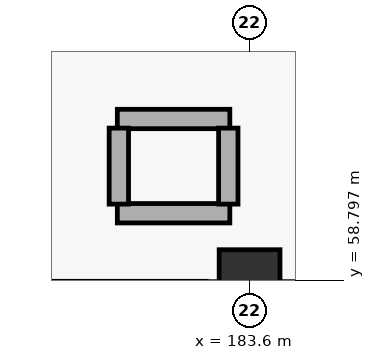
"""IFC4 building model, lengths in metres.
Left out: names, types, materials, properties, quantities, classifications, styles, units other than length and angle.
Written with IfcOpenShell. Run it as: python <this file> out.ifc"""

import sys

from ifc_helpers import new_model, si_unit, direction, frame, frame_2d, origin, origin_2d, place, context, subcontext, project, spatial, rectangle, extrude, element, save


model = new_model("IFC4")
c1 = context("Model", 3, precision=1e-05, world=origin(), true_north=direction((0.0, 1.0)))
c2 = subcontext(c1, "Body", "Model", "MODEL_VIEW")
j1 = project(units=[si_unit("LENGTHUNIT", "METRE"), si_unit("PLANEANGLEUNIT", "RADIAN")], contexts=[c1])
p1 = place(None, origin())
s1 = spatial("IfcSite", under=j1, at=p1, CompositionType="ELEMENT")
p2 = place(p1, origin())
s2 = spatial("IfcBuilding", under=s1, at=p2, CompositionType="ELEMENT")
p3 = place(p2, frame((0.0, 0.0, 10.5)))
s3 = spatial("IfcBuildingStorey", under=s2, at=p3, CompositionType="ELEMENT", Elevation=10.5)
p4 = place(p3, frame((183.6, 58.8, 0.0), z_axis=(0.0, 0.0, 1.0), x_axis=(1.0, 0.0, 0.0)))
e1 = element("IfcColumn", 1, at=p4, inside=s3, PredefinedType="COLUMN", context=c2, shape_type="SweptSolid", body=[
    extrude(rectangle(XDim=0.8, YDim=0.8, at=origin_2d()), origin(), (0.0, 0.0, 1.0), 5.1),
])
for number, where, z_axis, x_axis in (
    (2, (181.86, 60.92, 0.0), (0.0, 0.0, 1.0), (1.0, 0.0, 0.0)),
    (3, (181.86, 59.68, 0.0), (0.0, 0.0, 1.0), (1.0, 0.0, 0.0)),
):
    element("IfcWall", number, at=place(p3, frame(where, z_axis=z_axis, x_axis=x_axis)), inside=s3, PredefinedType="PARTITIONING", context=c2, shape_type="SweptSolid", body=[
        extrude(rectangle(XDim=1.48, YDim=0.255, at=frame_2d((0.74, 0.0))), origin(), (0.0, 0.0, 1.0), 4.0),
    ])
p5 = place(p3, frame((181.88, 59.8, 0.0), z_axis=(0.0, 0.0, 1.0), x_axis=(0.0, 1.0, 0.0)))
e4 = element("IfcWall", 4, at=p5, inside=s3, PredefinedType="PARTITIONING", context=c2, shape_type="SweptSolid", body=[
    extrude(rectangle(XDim=1.0, YDim=0.255, at=frame_2d((0.5, 0.0))), origin(), (0.0, 0.0, 1.0), 4.72),
])
p6 = place(p3, frame((183.32, 59.8, 0.0), z_axis=(0.0, 0.0, 1.0), x_axis=(0.0, 1.0, 0.0)))
e5 = element("IfcWall", 5, at=p6, inside=s3, PredefinedType="PARTITIONING", context=c2, shape_type="SweptSolid", body=[
    extrude(rectangle(XDim=1.0, YDim=0.255, at=frame_2d((0.5, 0.0))), origin(), (0.0, 0.0, 1.0), 4.0),
])
save(model, sys.argv[1])
